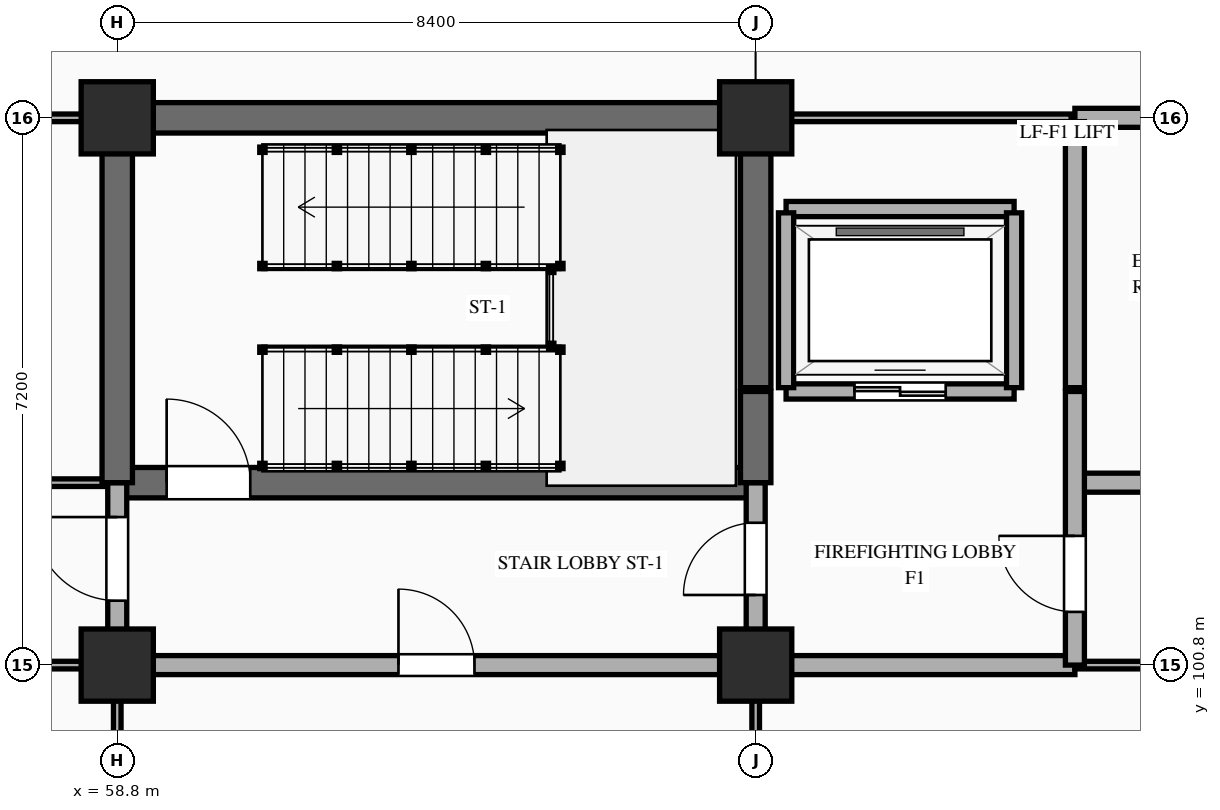
"""IFC4 building model, lengths in metres.
Left out: names, types, materials, properties, quantities, classifications, styles, units other than length and angle.
Written with IfcOpenShell. Run it as: python <this file> out.ifc"""

import sys

from ifc_helpers import new_model, si_unit, direction, frame, frame_2d, origin, origin_2d, place, context, subcontext, project, spatial, rectangle, extrude, element, fill, save


model = new_model("IFC4")
c1 = context("Model", 3, precision=1e-05, world=origin(), true_north=direction((0.0, 1.0)))
c2 = subcontext(c1, "Body", "Model", "MODEL_VIEW")
j1 = project(units=[si_unit("LENGTHUNIT", "METRE"), si_unit("PLANEANGLEUNIT", "RADIAN")], contexts=[c1])
p1 = place(None, origin())
s1 = spatial("IfcSite", under=j1, at=p1, CompositionType="ELEMENT")
p2 = place(p1, origin())
s2 = spatial("IfcBuilding", under=s1, at=p2, CompositionType="ELEMENT")
p3 = place(p2, frame((0.0, 0.0, -10.2)))
s3 = spatial("IfcBuildingStorey", under=s2, at=p3, CompositionType="ELEMENT", Elevation=-10.2)
for number, where, z_axis, x_axis in (
    (1, (58.8, 100.8, 0.0), (0.0, 0.0, 1.0), (1.0, 0.0, 0.0)),
    (2, (58.8, 108.0, 0.0), (0.0, 0.0, 1.0), (1.0, 0.0, 0.0)),
    (3, (67.2, 100.8, 0.0), (0.0, 0.0, 1.0), (1.0, 0.0, 0.0)),
    (4, (67.2, 108.0, 0.0), (0.0, 0.0, 1.0), (1.0, 0.0, 0.0)),
):
    element("IfcColumn", number, at=place(p3, frame(where, z_axis=z_axis, x_axis=x_axis)), inside=s3, PredefinedType="COLUMN", context=c2, shape_type="SweptSolid", body=[
        extrude(rectangle(XDim=0.95, YDim=0.95, at=origin_2d()), origin(), (0.0, 0.0, 1.0), 4.8),
    ])
p4 = place(p3, frame((46.2, 100.8, 0.0), z_axis=(0.0, 0.0, 1.0), x_axis=(1.0, 0.0, 0.0)))
e5 = element("IfcWall", 5, at=p4, inside=s3, PredefinedType="STANDARD", context=c2, shape_type="SweptSolid", body=[
    extrude(rectangle(XDim=12.6, YDim=0.1, at=frame_2d((6.3, 0.0))), origin(), (0.0, 0.0, 1.0), 3.63),
])
p5 = place(p4, frame((1.343, 0.0, 0.0)))
e6 = element("IfcOpeningElement", 6, at=p5, cuts=e5, PredefinedType="OPENING", context=c2, shape_type="SweptSolid", body=[
    extrude(rectangle(XDim=1.12, YDim=2.25, at=frame_2d((0.56, 1.125))), frame((0.0, 0.062, 0.0), z_axis=(0.0, -1.0, 0.0), x_axis=(1.0, 0.0, 0.0)), (0.0, 0.0, 1.0), 0.124),
])
p6 = place(p4, frame((5.667, 0.0, 0.0)))
e7 = element("IfcOpeningElement", 7, at=p6, cuts=e5, PredefinedType="OPENING", context=c2, shape_type="SweptSolid", body=[
    extrude(rectangle(XDim=0.86, YDim=2.1, at=frame_2d((0.43, 1.05))), frame((0.0, 0.062, 0.0), z_axis=(0.0, -1.0, 0.0), x_axis=(1.0, 0.0, 0.0)), (0.0, 0.0, 1.0), 0.124),
])
p7 = place(p4, frame((8.34, 0.0, 0.0)))
e8 = element("IfcOpeningElement", 8, at=p7, cuts=e5, PredefinedType="OPENING", context=c2, shape_type="SweptSolid", body=[
    extrude(rectangle(XDim=0.92, YDim=2.15, at=frame_2d((0.46, 1.075))), frame((0.0, 0.062, 0.0), z_axis=(0.0, -1.0, 0.0), x_axis=(1.0, 0.0, 0.0)), (0.0, 0.0, 1.0), 0.124),
])
p8 = place(p4, frame((10.623, 0.0, 0.0)))
e9 = element("IfcOpeningElement", 9, at=p8, cuts=e5, PredefinedType="OPENING", context=c2, shape_type="SweptSolid", body=[
    extrude(rectangle(XDim=0.96, YDim=2.2, at=frame_2d((0.48, 1.1))), frame((0.0, 0.062, 0.0), z_axis=(0.0, -1.0, 0.0), x_axis=(1.0, 0.0, 0.0)), (0.0, 0.0, 1.0), 0.124),
])
p9 = place(p3, frame((58.8, 100.8, 0.0), z_axis=(0.0, 0.0, 1.0), x_axis=(1.0, 0.0, 0.0)))
e10 = element("IfcWall", 10, at=p9, inside=s3, PredefinedType="STANDARD", context=c2, shape_type="SweptSolid", body=[
    extrude(rectangle(XDim=12.6, YDim=0.25, at=frame_2d((6.3, 0.0))), origin(), (0.0, 0.0, 1.0), 3.63),
])
p10 = place(p9, frame((3.7, 0.0, 0.0)))
e11 = element("IfcOpeningElement", 11, at=p10, cuts=e10, PredefinedType="OPENING", context=c2, shape_type="SweptSolid", body=[
    extrude(rectangle(XDim=1.0, YDim=2.2, at=frame_2d((0.5, 1.1))), frame((0.0, 0.137, 0.0), z_axis=(0.0, -1.0, 0.0), x_axis=(1.0, 0.0, 0.0)), (0.0, 0.0, 1.0), 0.274),
])
p11 = place(p3, frame((71.4, 100.8, 0.0), z_axis=(0.0, 0.0, 1.0), x_axis=(1.0, 0.0, 0.0)))
e12 = element("IfcWall", 12, at=p11, inside=s3, PredefinedType="STANDARD", context=c2, shape_type="SweptSolid", body=[
    extrude(rectangle(XDim=25.2, YDim=0.1, at=frame_2d((12.6, 0.0))), origin(), (0.0, 0.0, 1.0), 3.63),
])
p12 = place(p11, frame((1.413, 0.0, 0.0)))
e13 = element("IfcOpeningElement", 13, at=p12, cuts=e12, PredefinedType="OPENING", context=c2, shape_type="SweptSolid", body=[
    extrude(rectangle(XDim=0.98, YDim=2.35, at=frame_2d((0.49, 1.175))), frame((0.0, 0.062, 0.0), z_axis=(0.0, -1.0, 0.0), x_axis=(1.0, 0.0, 0.0)), (0.0, 0.0, 1.0), 0.124),
])
p13 = place(p11, frame((22.867, 0.0, 0.0)))
e14 = element("IfcOpeningElement", 14, at=p13, cuts=e12, PredefinedType="OPENING", context=c2, shape_type="SweptSolid", body=[
    extrude(rectangle(XDim=0.86, YDim=2.1, at=frame_2d((0.43, 1.05))), frame((0.0, 0.062, 0.0), z_axis=(0.0, -1.0, 0.0), x_axis=(1.0, 0.0, 0.0)), (0.0, 0.0, 1.0), 0.124),
])
p14 = place(p11, frame((7.84, 0.0, 0.0)))
e15 = element("IfcOpeningElement", 15, at=p14, cuts=e12, PredefinedType="OPENING", context=c2, shape_type="SweptSolid", body=[
    extrude(rectangle(XDim=1.12, YDim=2.25, at=frame_2d((0.56, 1.125))), frame((0.0, 0.062, 0.0), z_axis=(0.0, -1.0, 0.0), x_axis=(1.0, 0.0, 0.0)), (0.0, 0.0, 1.0), 0.124),
])
p15 = place(p11, frame((14.008, 0.0, 0.0)))
e16 = element("IfcOpeningElement", 16, at=p15, cuts=e12, PredefinedType="OPENING", context=c2, shape_type="SweptSolid", body=[
    extrude(rectangle(XDim=0.98, YDim=2.35, at=frame_2d((0.49, 1.175))), frame((0.0, 0.062, 0.0), z_axis=(0.0, -1.0, 0.0), x_axis=(1.0, 0.0, 0.0)), (0.0, 0.0, 1.0), 0.124),
])
p16 = place(p11, frame((16.69, 0.0, 0.0)))
e17 = element("IfcOpeningElement", 17, at=p16, cuts=e12, PredefinedType="OPENING", context=c2, shape_type="SweptSolid", body=[
    extrude(rectangle(XDim=1.02, YDim=2.4, at=frame_2d((0.51, 1.2))), frame((0.0, 0.062, 0.0), z_axis=(0.0, -1.0, 0.0), x_axis=(1.0, 0.0, 0.0)), (0.0, 0.0, 1.0), 0.124),
])
p17 = place(p11, frame((18.972, 0.0, 0.0)))
e18 = element("IfcOpeningElement", 18, at=p17, cuts=e12, PredefinedType="OPENING", context=c2, shape_type="SweptSolid", body=[
    extrude(rectangle(XDim=1.06, YDim=2.4, at=frame_2d((0.53, 1.2))), frame((0.0, 0.062, 0.0), z_axis=(0.0, -1.0, 0.0), x_axis=(1.0, 0.0, 0.0)), (0.0, 0.0, 1.0), 0.124),
])
p18 = place(p3, frame((50.4, 103.2, 0.0), z_axis=(0.0, 0.0, 1.0), x_axis=(1.0, 0.0, 0.0)))
e19 = element("IfcWall", 19, at=p18, inside=s3, PredefinedType="STANDARD", context=c2, shape_type="SweptSolid", body=[
    extrude(rectangle(XDim=8.4, YDim=0.1, at=frame_2d((4.2, 0.0))), origin(), (0.0, 0.0, 1.0), 4.48),
])
p19 = place(p18, frame((3.75, 0.0, 0.0)))
e20 = element("IfcOpeningElement", 20, at=p19, cuts=e19, PredefinedType="OPENING", context=c2, shape_type="SweptSolid", body=[
    extrude(rectangle(XDim=0.9, YDim=2.15, at=frame_2d((0.45, 1.075))), frame((0.0, 0.062, 0.0), z_axis=(0.0, -1.0, 0.0), x_axis=(1.0, 0.0, 0.0)), (0.0, 0.0, 1.0), 0.124),
])
p20 = place(p3, frame((58.8, 103.2, 0.0), z_axis=(0.0, 0.0, 1.0), x_axis=(1.0, 0.0, 0.0)))
e21 = element("IfcWall", 21, at=p20, inside=s3, PredefinedType="SHEAR", context=c2, shape_type="SweptSolid", body=[
    extrude(rectangle(XDim=8.4, YDim=0.4, at=frame_2d((4.2, 0.0))), origin(), (0.0, 0.0, 1.0), 4.48),
])
p21 = place(p20, frame((0.65, 0.0, 0.0)))
e22 = element("IfcOpeningElement", 22, at=p21, cuts=e21, PredefinedType="OPENING", context=c2, shape_type="SweptSolid", body=[
    extrude(rectangle(XDim=1.1, YDim=2.2, at=frame_2d((0.55, 1.1))), frame((0.0, 0.212, 0.0), z_axis=(0.0, -1.0, 0.0), x_axis=(1.0, 0.0, 0.0)), (0.0, 0.0, 1.0), 0.424),
])
p22 = place(p3, frame((71.4, 103.2, 0.0), z_axis=(0.0, 0.0, 1.0), x_axis=(1.0, 0.0, 0.0)))
e23 = element("IfcWall", 23, at=p22, inside=s3, PredefinedType="STANDARD", context=c2, shape_type="SweptSolid", body=[
    extrude(rectangle(XDim=4.2, YDim=0.25, at=frame_2d((2.1, 0.0))), origin(), (0.0, 0.0, 1.0), 4.48),
])
p23 = place(p22, frame((1.625, 0.0, 0.0)))
e24 = element("IfcOpeningElement", 24, at=p23, cuts=e23, PredefinedType="OPENING", context=c2, shape_type="SweptSolid", body=[
    extrude(rectangle(XDim=0.95, YDim=2.15, at=frame_2d((0.475, 1.075))), frame((0.0, 0.137, 0.0), z_axis=(0.0, -1.0, 0.0), x_axis=(1.0, 0.0, 0.0)), (0.0, 0.0, 1.0), 0.274),
])
p24 = place(p3, frame((67.6, 104.4, 0.0), z_axis=(0.0, 0.0, 1.0), x_axis=(1.0, 0.0, 0.0)))
e25 = element("IfcWall", 25, at=p24, inside=s3, PredefinedType="STANDARD", context=c2, shape_type="SweptSolid", body=[
    extrude(rectangle(XDim=3.0, YDim=0.2, at=frame_2d((1.5, 0.0))), origin(), (0.0, 0.0, 1.0), 4.48),
])
p25 = place(p24, frame((0.9, 0.0, 0.0)))
e26 = element("IfcOpeningElement", 26, at=p25, cuts=e25, PredefinedType="OPENING", context=c2, shape_type="SweptSolid", body=[
    extrude(rectangle(XDim=1.2, YDim=2.15, at=frame_2d((0.6, 1.075))), frame((0.0, 0.112, 0.0), z_axis=(0.0, -1.0, 0.0), x_axis=(1.0, 0.0, 0.0)), (0.0, 0.0, 1.0), 0.224),
])
p26 = place(p3, frame((67.6, 106.8, 0.0), z_axis=(0.0, 0.0, 1.0), x_axis=(1.0, 0.0, 0.0)))
e27 = element("IfcWall", 27, at=p26, inside=s3, PredefinedType="STANDARD", context=c2, shape_type="SweptSolid", body=[
    extrude(rectangle(XDim=3.0, YDim=0.2, at=frame_2d((1.5, 0.0))), origin(), (0.0, 0.0, 1.0), 4.48),
])
p27 = place(p3, frame((50.4, 108.0, 0.0), z_axis=(0.0, 0.0, 1.0), x_axis=(1.0, 0.0, 0.0)))
e28 = element("IfcWall", 28, at=p27, inside=s3, PredefinedType="STANDARD", context=c2, shape_type="SweptSolid", body=[
    extrude(rectangle(XDim=8.4, YDim=0.1, at=frame_2d((4.2, 0.0))), origin(), (0.0, 0.0, 1.0), 3.63),
])
p28 = place(p27, frame((3.7, 0.0, 0.0)))
e29 = element("IfcOpeningElement", 29, at=p28, cuts=e28, PredefinedType="OPENING", context=c2, shape_type="SweptSolid", body=[
    extrude(rectangle(XDim=1.0, YDim=2.25, at=frame_2d((0.5, 1.125))), frame((0.0, 0.062, 0.0), z_axis=(0.0, -1.0, 0.0), x_axis=(1.0, 0.0, 0.0)), (0.0, 0.0, 1.0), 0.124),
])
p29 = place(p3, frame((58.8, 108.0, 0.0), z_axis=(0.0, 0.0, 1.0), x_axis=(1.0, 0.0, 0.0)))
e30 = element("IfcWall", 30, at=p29, inside=s3, PredefinedType="SHEAR", context=c2, shape_type="SweptSolid", body=[
    extrude(rectangle(XDim=8.4, YDim=0.4, at=frame_2d((4.2, 0.0))), origin(), (0.0, 0.0, 1.0), 4.48),
])
p30 = place(p3, frame((67.25, 108.0, 0.0), z_axis=(0.0, 0.0, 1.0), x_axis=(1.0, 0.0, 0.0)))
e31 = element("IfcWall", 31, at=p30, inside=s3, PredefinedType="STANDARD", context=c2, shape_type="SweptSolid", body=[
    extrude(rectangle(XDim=4.1, YDim=0.1, at=frame_2d((2.05, 0.0))), origin(), (0.0, 0.0, 1.0), 3.63),
])
p31 = place(p3, frame((71.4, 108.0, 0.0), z_axis=(0.0, 0.0, 1.0), x_axis=(1.0, 0.0, 0.0)))
e32 = element("IfcWall", 32, at=p31, inside=s3, PredefinedType="STANDARD", context=c2, shape_type="SweptSolid", body=[
    extrude(rectangle(XDim=4.2, YDim=0.25, at=frame_2d((2.1, 0.0))), origin(), (0.0, 0.0, 1.0), 3.63),
])
p32 = place(p31, frame((1.427, 0.0, 0.0)))
e33 = element("IfcOpeningElement", 33, at=p32, cuts=e32, PredefinedType="OPENING", context=c2, shape_type="SweptSolid", body=[
    extrude(rectangle(XDim=0.95, YDim=2.15, at=frame_2d((0.475, 1.075))), frame((0.0, 0.137, 0.0), z_axis=(0.0, -1.0, 0.0), x_axis=(1.0, 0.0, 0.0)), (0.0, 0.0, 1.0), 0.274),
])
p33 = place(p3, frame((58.8, 96.0, 0.0), z_axis=(0.0, 0.0, 1.0), x_axis=(0.0, 1.0, 0.0)))
e34 = element("IfcWall", 34, at=p33, inside=s3, PredefinedType="STANDARD", context=c2, shape_type="SweptSolid", body=[
    extrude(rectangle(XDim=4.8, YDim=0.1, at=frame_2d((2.4, 0.0))), origin(), (0.0, 0.0, 1.0), 3.73),
])
p34 = place(p3, frame((58.8, 100.8, 0.0), z_axis=(0.0, 0.0, 1.0), x_axis=(0.0, 1.0, 0.0)))
e35 = element("IfcWall", 35, at=p34, inside=s3, PredefinedType="STANDARD", context=c2, shape_type="SweptSolid", body=[
    extrude(rectangle(XDim=2.4, YDim=0.25, at=frame_2d((1.2, 0.0))), origin(), (0.0, 0.0, 1.0), 3.73),
])
p35 = place(p34, frame((0.847, 0.0, 0.0)))
e36 = element("IfcOpeningElement", 36, at=p35, cuts=e35, PredefinedType="OPENING", context=c2, shape_type="SweptSolid", body=[
    extrude(rectangle(XDim=1.1, YDim=2.2, at=frame_2d((0.55, 1.1))), frame((0.0, 0.137, 0.0), z_axis=(0.0, -1.0, 0.0), x_axis=(1.0, 0.0, 0.0)), (0.0, 0.0, 1.0), 0.274),
])
p36 = place(p3, frame((58.8, 103.2, 0.0), z_axis=(0.0, 0.0, 1.0), x_axis=(0.0, 1.0, 0.0)))
e37 = element("IfcWall", 37, at=p36, inside=s3, PredefinedType="SHEAR", context=c2, shape_type="SweptSolid", body=[
    extrude(rectangle(XDim=4.8, YDim=0.4, at=frame_2d((2.4, 0.0))), origin(), (0.0, 0.0, 1.0), 4.48),
])
p37 = place(p3, frame((67.2, 96.0, 0.0), z_axis=(0.0, 0.0, 1.0), x_axis=(0.0, 1.0, 0.0)))
e38 = element("IfcWall", 38, at=p37, inside=s3, PredefinedType="STANDARD", context=c2, shape_type="SweptSolid", body=[
    extrude(rectangle(XDim=4.8, YDim=0.1, at=frame_2d((2.4, 0.0))), origin(), (0.0, 0.0, 1.0), 3.73),
])
p38 = place(p3, frame((67.2, 100.8, 0.0), z_axis=(0.0, 0.0, 1.0), x_axis=(0.0, 1.0, 0.0)))
e39 = element("IfcWall", 39, at=p38, inside=s3, PredefinedType="STANDARD", context=c2, shape_type="SweptSolid", body=[
    extrude(rectangle(XDim=2.4, YDim=0.25, at=frame_2d((1.2, 0.0))), origin(), (0.0, 0.0, 1.0), 3.73),
])
p39 = place(p38, frame((0.923, 0.0, 0.0)))
e40 = element("IfcOpeningElement", 40, at=p39, cuts=e39, PredefinedType="OPENING", context=c2, shape_type="SweptSolid", body=[
    extrude(rectangle(XDim=0.95, YDim=2.15, at=frame_2d((0.475, 1.075))), frame((0.0, 0.137, 0.0), z_axis=(0.0, -1.0, 0.0), x_axis=(1.0, 0.0, 0.0)), (0.0, 0.0, 1.0), 0.274),
])
p40 = place(p3, frame((67.2, 103.2, 0.0), z_axis=(0.0, 0.0, 1.0), x_axis=(0.0, 1.0, 0.0)))
e41 = element("IfcWall", 41, at=p40, inside=s3, PredefinedType="SHEAR", context=c2, shape_type="SweptSolid", body=[
    extrude(rectangle(XDim=1.2, YDim=0.4, at=frame_2d((0.6, 0.0))), origin(), (0.0, 0.0, 1.0), 4.48),
])
p41 = place(p3, frame((67.2, 104.45, 0.0), z_axis=(0.0, 0.0, 1.0), x_axis=(0.0, 1.0, 0.0)))
e42 = element("IfcWall", 42, at=p41, inside=s3, PredefinedType="SHEAR", context=c2, shape_type="SweptSolid", body=[
    extrude(rectangle(XDim=3.5, YDim=0.4, at=frame_2d((1.75, 0.0))), origin(), (0.0, 0.0, 1.0), 4.48),
])
for number, where, z_axis, x_axis in (
    (43, (67.6, 104.45, 0.0), (0.0, 0.0, 1.0), (0.0, 1.0, 0.0)),
    (44, (70.6, 104.45, 0.0), (0.0, 0.0, 1.0), (0.0, 1.0, 0.0)),
):
    element("IfcWall", number, at=place(p3, frame(where, z_axis=z_axis, x_axis=x_axis)), inside=s3, PredefinedType="STANDARD", context=c2, shape_type="SweptSolid", body=[
        extrude(rectangle(XDim=2.3, YDim=0.2, at=frame_2d((1.15, 0.0))), origin(), (0.0, 0.0, 1.0), 4.48),
    ])
p42 = place(p3, frame((71.4, 100.8, 0.0), z_axis=(0.0, 0.0, 1.0), x_axis=(0.0, 1.0, 0.0)))
e45 = element("IfcWall", 45, at=p42, inside=s3, PredefinedType="STANDARD", context=c2, shape_type="SweptSolid", body=[
    extrude(rectangle(XDim=3.6, YDim=0.25, at=frame_2d((1.8, 0.0))), origin(), (0.0, 0.0, 1.0), 4.48),
])
p43 = place(p42, frame((0.7, 0.0, 0.0)))
e46 = element("IfcOpeningElement", 46, at=p43, cuts=e45, PredefinedType="OPENING", context=c2, shape_type="SweptSolid", body=[
    extrude(rectangle(XDim=1.0, YDim=2.2, at=frame_2d((0.5, 1.1))), frame((0.0, 0.137, 0.0), z_axis=(0.0, -1.0, 0.0), x_axis=(1.0, 0.0, 0.0)), (0.0, 0.0, 1.0), 0.274),
])
p44 = place(p3, frame((71.4, 104.45, 0.0), z_axis=(0.0, 0.0, 1.0), x_axis=(0.0, 1.0, 0.0)))
e47 = element("IfcWall", 47, at=p44, inside=s3, PredefinedType="STANDARD", context=c2, shape_type="SweptSolid", body=[
    extrude(rectangle(XDim=3.5, YDim=0.25, at=frame_2d((1.75, 0.0))), origin(), (0.0, 0.0, 1.0), 4.48),
])
p45 = place(p25, origin())
e48 = element("IfcDoor", 48, at=p45, inside=s3, OperationType="DOUBLE_DOOR_SLIDING", PredefinedType="DOOR", context=c2, shape_type="SweptSolid", body=[
    extrude(rectangle(XDim=1.2, YDim=2.15, at=frame_2d((0.6, 1.075))), frame((0.0, 0.025, 0.0), z_axis=(0.0, -1.0, 0.0), x_axis=(1.0, 0.0, 0.0)), (0.0, 0.0, 1.0), 0.05),
])
fill(e26, e48)
p46 = place(p21, origin())
e49 = element("IfcDoor", 49, at=p46, inside=s3, OperationType="SINGLE_SWING_LEFT", PredefinedType="DOOR", context=c2, shape_type="SweptSolid", body=[
    extrude(rectangle(XDim=1.1, YDim=2.2, at=frame_2d((0.55, 1.1))), frame((0.0, 0.025, 0.0), z_axis=(0.0, -1.0, 0.0), x_axis=(1.0, 0.0, 0.0)), (0.0, 0.0, 1.0), 0.05),
])
fill(e22, e49)
p47 = place(p39, origin())
e50 = element("IfcDoor", 50, at=p47, inside=s3, OperationType="SINGLE_SWING_LEFT", PredefinedType="DOOR", context=c2, shape_type="SweptSolid", body=[
    extrude(rectangle(XDim=0.95, YDim=2.15, at=frame_2d((0.475, 1.075))), frame((0.0, 0.025, 0.0), z_axis=(0.0, -1.0, 0.0), x_axis=(1.0, 0.0, 0.0)), (0.0, 0.0, 1.0), 0.05),
])
fill(e40, e50)
p48 = place(p35, origin())
e51 = element("IfcDoor", 51, at=p48, inside=s3, OperationType="SINGLE_SWING_RIGHT", PredefinedType="DOOR", context=c2, shape_type="SweptSolid", body=[
    extrude(rectangle(XDim=1.1, YDim=2.2, at=frame_2d((0.55, 1.1))), frame((0.0, 0.025, 0.0), z_axis=(0.0, -1.0, 0.0), x_axis=(1.0, 0.0, 0.0)), (0.0, 0.0, 1.0), 0.05),
])
fill(e36, e51)
p49 = place(p10, origin())
e52 = element("IfcDoor", 52, at=p49, inside=s3, OperationType="SINGLE_SWING_LEFT", PredefinedType="DOOR", context=c2, shape_type="SweptSolid", body=[
    extrude(rectangle(XDim=1.0, YDim=2.2, at=frame_2d((0.5, 1.1))), frame((0.0, 0.025, 0.0), z_axis=(0.0, -1.0, 0.0), x_axis=(1.0, 0.0, 0.0)), (0.0, 0.0, 1.0), 0.05),
])
fill(e11, e52)
p50 = place(p43, origin())
e53 = element("IfcDoor", 53, at=p50, inside=s3, OperationType="SINGLE_SWING_RIGHT", PredefinedType="DOOR", context=c2, shape_type="SweptSolid", body=[
    extrude(rectangle(XDim=1.0, YDim=2.2, at=frame_2d((0.5, 1.1))), frame((0.0, 0.025, 0.0), z_axis=(0.0, -1.0, 0.0), x_axis=(1.0, 0.0, 0.0)), (0.0, 0.0, 1.0), 0.05),
])
fill(e46, e53)
save(model, sys.argv[1])
